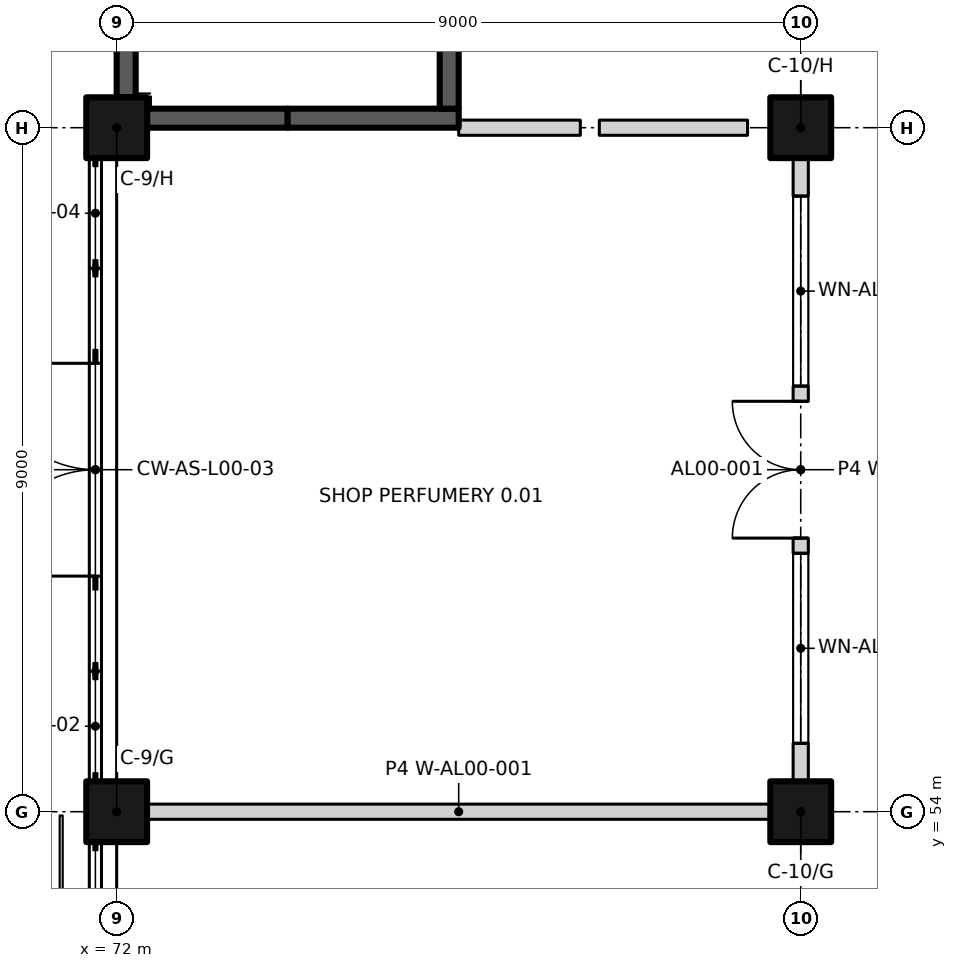
"""IFC4 building model, lengths in metres.
Left out: names, types, materials, properties, quantities, classifications, styles, units other than length and angle.
Written with IfcOpenShell. Run it as: python <this file> out.ifc"""

import sys

from ifc_helpers import new_model, si_unit, direction, frame, frame_2d, origin, origin_2d, place, context, subcontext, project, spatial, rectangle, extrude, element, fill, save


model = new_model("IFC4")
c1 = context("Model", 3, precision=1e-05, world=origin(), true_north=direction((0.0, 1.0)))
c2 = subcontext(c1, "Body", "Model", "MODEL_VIEW")
j1 = project(units=[si_unit("LENGTHUNIT", "METRE"), si_unit("PLANEANGLEUNIT", "RADIAN")], contexts=[c1])
p1 = place(None, origin())
s1 = spatial("IfcSite", under=j1, at=p1, CompositionType="ELEMENT")
p2 = place(p1, origin())
s2 = spatial("IfcBuilding", under=s1, at=p2, CompositionType="ELEMENT")
p3 = place(p2, origin())
s3 = spatial("IfcBuildingStorey", under=s2, at=p3, CompositionType="ELEMENT", Elevation=0.0)
for number, where, z_axis, x_axis in (
    (1, (72.0, 54.0, 0.0), (0.0, 0.0, 1.0), (1.0, 0.0, 0.0)),
    (2, (81.0, 54.0, 0.0), (0.0, 0.0, 1.0), (1.0, 0.0, 0.0)),
    (3, (72.0, 63.0, 0.0), (0.0, 0.0, 1.0), (1.0, 0.0, 0.0)),
    (4, (81.0, 63.0, 0.0), (0.0, 0.0, 1.0), (1.0, 0.0, 0.0)),
):
    element("IfcColumn", number, at=place(p3, frame(where, z_axis=z_axis, x_axis=x_axis)), inside=s3, PredefinedType="COLUMN", context=c2, shape_type="SweptSolid", body=[
        extrude(rectangle(XDim=0.8, YDim=0.8, at=origin_2d()), origin(), (0.0, 0.0, 1.0), 6.0),
    ])
p4 = place(p3, frame((72.4, 63.125, 0.0), z_axis=(0.0, 0.0, 1.0), x_axis=(1.0, 0.0, 0.0)))
e5 = element("IfcWall", 5, at=p4, inside=s3, PredefinedType="SHEAR", context=c2, shape_type="SweptSolid", body=[
    extrude(rectangle(XDim=1.85, YDim=0.25, at=frame_2d((0.925, 0.0))), origin(), (0.0, 0.0, 1.0), 5.7),
])
p5 = place(p3, frame((74.25, 63.125, 0.0), z_axis=(0.0, 0.0, 1.0), x_axis=(1.0, 0.0, 0.0)))
e6 = element("IfcWall", 6, at=p5, inside=s3, PredefinedType="SHEAR", context=c2, shape_type="SweptSolid", body=[
    extrude(rectangle(XDim=2.25, YDim=0.25, at=frame_2d((1.125, 0.0))), origin(), (0.0, 0.0, 1.0), 5.7),
])
p6 = place(p3, frame((72.125, 63.4, 0.0), z_axis=(0.0, 0.0, 1.0), x_axis=(0.0, 1.0, 0.0)))
e7 = element("IfcWall", 7, at=p6, inside=s3, PredefinedType="SHEAR", context=c2, shape_type="SweptSolid", body=[
    extrude(rectangle(XDim=8.2, YDim=0.25, at=frame_2d((4.1, 0.0))), origin(), (0.0, 0.0, 1.0), 5.2),
])
p7 = place(p6, frame((6.625, 0.0, 0.0)))
e8 = element("IfcOpeningElement", 8, at=p7, cuts=e7, PredefinedType="OPENING", context=c2, shape_type="SweptSolid", body=[
    extrude(rectangle(XDim=1.4, YDim=2.1, at=frame_2d((0.7, 1.05))), frame((0.0, 0.135, 0.0), z_axis=(0.0, -1.0, 0.0), x_axis=(1.0, 0.0, 0.0)), (0.0, 0.0, 1.0), 0.27),
])
p8 = place(p3, frame((76.375, 63.25, 0.0), z_axis=(0.0, 0.0, 1.0), x_axis=(0.0, 1.0, 0.0)))
e9 = element("IfcWall", 9, at=p8, inside=s3, PredefinedType="SHEAR", context=c2, shape_type="SweptSolid", body=[
    extrude(rectangle(XDim=8.5, YDim=0.25, at=frame_2d((4.25, 0.0))), origin(), (0.0, 0.0, 1.0), 5.7),
])
p9 = place(p3, frame((71.72, 57.03, 0.0), z_axis=(0.0, 0.0, 1.0), x_axis=(0.0, 1.0, 0.0)))
e10 = element("IfcWall", 10, at=p9, inside=s3, PredefinedType="STANDARD", context=c2, shape_type="SweptSolid", body=[
    extrude(rectangle(XDim=2.94, YDim=0.12, at=frame_2d((1.47, 0.0))), origin(), (0.0, 0.0, 1.0), 2.97),
])
p10 = place(p9, frame((0.07, 0.0, 0.0)))
e11 = element("IfcOpeningElement", 11, at=p10, cuts=e10, PredefinedType="OPENING", context=c2, shape_type="SweptSolid", body=[
    extrude(rectangle(XDim=2.8, YDim=2.4, at=frame_2d((1.4, 1.2))), frame((0.0, 0.07, 0.0), z_axis=(0.0, -1.0, 0.0), x_axis=(1.0, 0.0, 0.0)), (0.0, 0.0, 1.0), 0.14),
])
p11 = place(p3, frame((72.4, 54.0, 0.0), z_axis=(0.0, 0.0, 1.0), x_axis=(1.0, 0.0, 0.0)))
e12 = element("IfcWall", 12, at=p11, inside=s3, PredefinedType="PARTITIONING", context=c2, shape_type="SweptSolid", body=[
    extrude(rectangle(XDim=8.2, YDim=0.2, at=frame_2d((4.1, 0.0))), origin(), (0.0, 0.0, 1.0), 5.65),
])
p12 = place(p3, frame((81.0, 54.4, 0.0), z_axis=(0.0, 0.0, 1.0), x_axis=(0.0, 1.0, 0.0)))
e13 = element("IfcWall", 13, at=p12, inside=s3, PredefinedType="PARTITIONING", context=c2, shape_type="SweptSolid", body=[
    extrude(rectangle(XDim=8.2, YDim=0.2, at=frame_2d((4.1, 0.0))), origin(), (0.0, 0.0, 1.0), 5.2),
])
p13 = place(p12, frame((3.2, 0.0, 0.0)))
e14 = element("IfcOpeningElement", 14, at=p13, cuts=e13, PredefinedType="OPENING", context=c2, shape_type="SweptSolid", body=[
    extrude(rectangle(XDim=1.8, YDim=2.1, at=frame_2d((0.9, 1.05))), frame((0.0, 0.11, 0.0), z_axis=(0.0, -1.0, 0.0), x_axis=(1.0, 0.0, 0.0)), (0.0, 0.0, 1.0), 0.22),
])
p14 = place(p12, frame((0.5, 0.0, 0.15)))
e15 = element("IfcOpeningElement", 15, at=p14, cuts=e13, PredefinedType="OPENING", context=c2, shape_type="SweptSolid", body=[
    extrude(rectangle(XDim=2.5, YDim=2.4, at=frame_2d((1.25, 1.2))), frame((0.0, 0.11, 0.0), z_axis=(0.0, -1.0, 0.0), x_axis=(1.0, 0.0, 0.0)), (0.0, 0.0, 1.0), 0.22),
])
p15 = place(p12, frame((5.2, 0.0, 0.15)))
e16 = element("IfcOpeningElement", 16, at=p15, cuts=e13, PredefinedType="OPENING", context=c2, shape_type="SweptSolid", body=[
    extrude(rectangle(XDim=2.5, YDim=2.4, at=frame_2d((1.25, 1.2))), frame((0.0, 0.11, 0.0), z_axis=(0.0, -1.0, 0.0), x_axis=(1.0, 0.0, 0.0)), (0.0, 0.0, 1.0), 0.22),
])
p16 = place(p3, frame((76.5, 63.0, 0.0), z_axis=(0.0, 0.0, 1.0), x_axis=(1.0, 0.0, 0.0)))
e17 = element("IfcWall", 17, at=p16, inside=s3, PredefinedType="PARTITIONING", context=c2, shape_type="SweptSolid", body=[
    extrude(rectangle(XDim=1.6, YDim=0.2, at=frame_2d((0.8, 0.0))), origin(), (0.0, 0.0, 1.0), 5.65),
])
p17 = place(p3, frame((78.35, 63.0, 0.0), z_axis=(0.0, 0.0, 1.0), x_axis=(1.0, 0.0, 0.0)))
e18 = element("IfcWall", 18, at=p17, inside=s3, PredefinedType="PARTITIONING", context=c2, shape_type="SweptSolid", body=[
    extrude(rectangle(XDim=1.95, YDim=0.2, at=frame_2d((0.975, 0.0))), origin(), (0.0, 0.0, 1.0), 5.65),
])
p18 = place(p10, origin())
e19 = element("IfcDoor", 19, at=p18, inside=s3, OperationType="DOUBLE_DOOR_SINGLE_SWING", PredefinedType="DOOR", context=c2, shape_type="SweptSolid", body=[
    extrude(rectangle(XDim=2.8, YDim=2.4, at=frame_2d((1.4, 1.2))), frame((0.0, 0.025, 0.0), z_axis=(0.0, -1.0, 0.0), x_axis=(1.0, 0.0, 0.0)), (0.0, 0.0, 1.0), 0.05),
])
fill(e11, e19)
p19 = place(p13, origin())
e20 = element("IfcDoor", 20, at=p19, inside=s3, OperationType="DOUBLE_DOOR_SINGLE_SWING", PredefinedType="DOOR", context=c2, shape_type="SweptSolid", body=[
    extrude(rectangle(XDim=1.8, YDim=2.1, at=frame_2d((0.9, 1.05))), frame((0.0, 0.025, 0.0), z_axis=(0.0, -1.0, 0.0), x_axis=(1.0, 0.0, 0.0)), (0.0, 0.0, 1.0), 0.05),
])
fill(e14, e20)
p20 = place(p14, origin())
e21 = element("IfcWindow", 21, at=p20, inside=s3, PartitioningType="SINGLE_PANEL", PredefinedType="WINDOW", context=c2, shape_type="SweptSolid", body=[
    extrude(rectangle(XDim=2.5, YDim=2.4, at=frame_2d((1.25, 1.2))), frame((0.0, 0.03, 0.0), z_axis=(0.0, -1.0, 0.0), x_axis=(1.0, 0.0, 0.0)), (0.0, 0.0, 1.0), 0.06),
])
fill(e15, e21)
p21 = place(p15, origin())
e22 = element("IfcWindow", 22, at=p21, inside=s3, PartitioningType="SINGLE_PANEL", PredefinedType="WINDOW", context=c2, shape_type="SweptSolid", body=[
    extrude(rectangle(XDim=2.5, YDim=2.4, at=frame_2d((1.25, 1.2))), frame((0.0, 0.03, 0.0), z_axis=(0.0, -1.0, 0.0), x_axis=(1.0, 0.0, 0.0)), (0.0, 0.0, 1.0), 0.06),
])
fill(e16, e22)
save(model, sys.argv[1])
